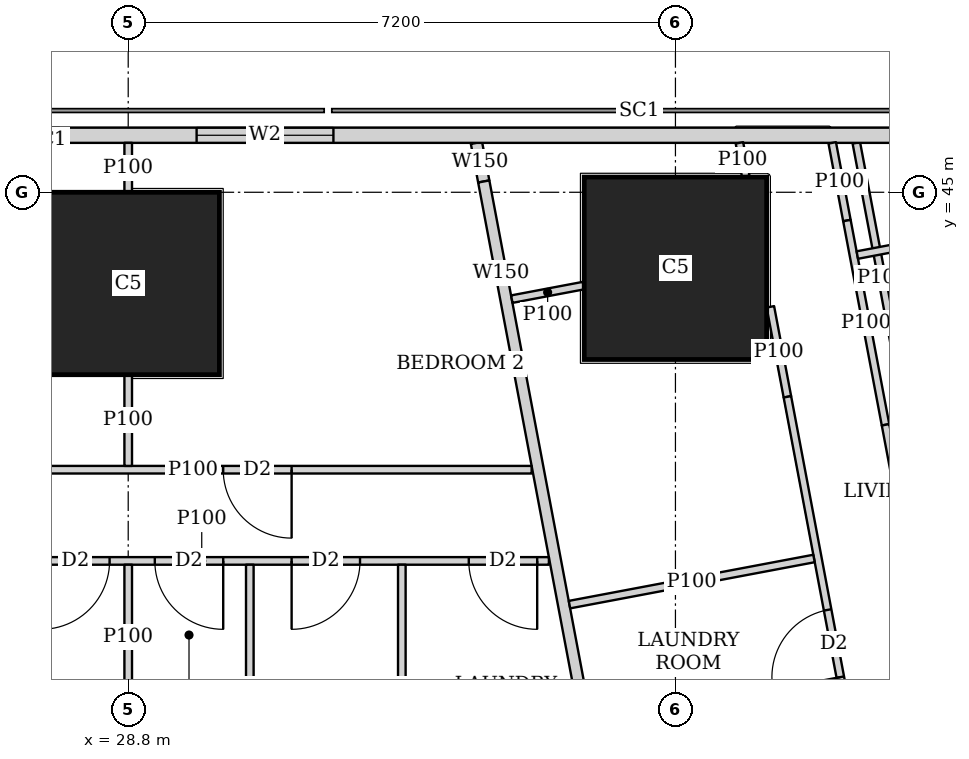
"""IFC4 building model, lengths in metres.
Left out: names, types, materials, properties, quantities, classifications, styles, units other than length and angle.
Written with IfcOpenShell. Run it as: python <this file> out.ifc"""

import sys

from ifc_helpers import new_model, si_unit, direction, frame, frame_2d, origin, origin_2d, place, context, subcontext, project, spatial, rectangle, extrude, element, fill, save


model = new_model("IFC4")
c1 = context("Model", 3, precision=1e-05, world=origin(), true_north=direction((0.0, 1.0)))
c2 = subcontext(c1, "Body", "Model", "MODEL_VIEW")
j1 = project(units=[si_unit("LENGTHUNIT", "METRE"), si_unit("PLANEANGLEUNIT", "RADIAN")], contexts=[c1])
p1 = place(None, origin())
s1 = spatial("IfcSite", under=j1, at=p1, CompositionType="ELEMENT")
p2 = place(p1, origin())
s2 = spatial("IfcBuilding", under=s1, at=p2, CompositionType="ELEMENT")
p3 = place(p2, frame((0.0, 0.0, 242.45)))
s3 = spatial("IfcBuildingStorey", under=s2, at=p3, CompositionType="ELEMENT", Elevation=242.45)
for number, where, z_axis, x_axis in (
    (1, (28.8, 43.8, 0.0), (0.0, 0.0, 1.0), (1.0, 0.0, 0.0)),
    (2, (36.0, 44.0, 0.0), (0.0, 0.0, 1.0), (1.0, 0.0, 0.0)),
):
    element("IfcColumn", number, at=place(p3, frame(where, z_axis=z_axis, x_axis=x_axis)), inside=s3, PredefinedType="COLUMN", context=c2, shape_type="SweptSolid", body=[
        extrude(rectangle(XDim=2.4, YDim=2.4, at=origin_2d()), origin(), (0.0, 0.0, 1.0), 3.75),
    ])
p4 = place(p3, frame((40.106, 45.75, 0.0), z_axis=(0.0, 0.0, 1.0), x_axis=(-1.0, 0.0, 0.0)))
e3 = element("IfcWall", 3, at=p4, inside=s3, PredefinedType="SOLIDWALL", context=c2, shape_type="SweptSolid", body=[
    extrude(rectangle(XDim=25.543, YDim=0.2, at=frame_2d((12.771, 0.0))), origin(), (0.0, 0.0, 1.0), 3.45),
])
p5 = place(p4, frame((8.606, 0.0, 0.9)))
e4 = element("IfcOpeningElement", 4, at=p5, cuts=e3, PredefinedType="OPENING", context=c2, shape_type="SweptSolid", body=[
    extrude(rectangle(XDim=1.8, YDim=1.5, at=frame_2d((0.9, 0.75))), frame((0.0, 0.11, 0.0), z_axis=(0.0, -1.0, 0.0), x_axis=(1.0, 0.0, 0.0)), (0.0, 0.0, 1.0), 0.22),
])
p6 = place(p4, frame((12.206, 0.0, 0.9)))
e5 = element("IfcOpeningElement", 5, at=p6, cuts=e3, PredefinedType="OPENING", context=c2, shape_type="SweptSolid", body=[
    extrude(rectangle(XDim=1.8, YDim=1.5, at=frame_2d((0.9, 0.75))), frame((0.0, 0.11, 0.0), z_axis=(0.0, -1.0, 0.0), x_axis=(1.0, 0.0, 0.0)), (0.0, 0.0, 1.0), 0.22),
])
p7 = place(p4, frame((15.806, 0.0, 0.9)))
e6 = element("IfcOpeningElement", 6, at=p7, cuts=e3, PredefinedType="OPENING", context=c2, shape_type="SweptSolid", body=[
    extrude(rectangle(XDim=1.8, YDim=1.5, at=frame_2d((0.9, 0.75))), frame((0.0, 0.11, 0.0), z_axis=(0.0, -1.0, 0.0), x_axis=(1.0, 0.0, 0.0)), (0.0, 0.0, 1.0), 0.22),
])
p8 = place(p4, frame((20.825, 0.0, 0.9)))
e7 = element("IfcOpeningElement", 7, at=p8, cuts=e3, PredefinedType="OPENING", context=c2, shape_type="SweptSolid", body=[
    extrude(rectangle(XDim=2.4, YDim=1.5, at=frame_2d((1.2, 0.75))), frame((0.0, 0.11, 0.0), z_axis=(0.0, -1.0, 0.0), x_axis=(1.0, 0.0, 0.0)), (0.0, 0.0, 1.0), 0.22),
])
p9 = place(p3, frame((33.382, 45.65, 0.0), z_axis=(0.0, 0.0, 1.0), x_axis=(0.185657456326, -0.982614527122, 0.0)))
e8 = element("IfcWall", 8, at=p9, inside=s3, PredefinedType="SOLIDWALL", context=c2, shape_type="SweptSolid", body=[
    extrude(rectangle(XDim=0.517, YDim=0.15, at=frame_2d((0.258, 0.0))), origin(), (0.0, 0.0, 1.0), 3.45),
])
p10 = place(p3, frame((33.478, 45.142, 0.0), z_axis=(0.0, 0.0, 1.0), x_axis=(0.185393362436, -0.982664388876, 0.0)))
e9 = element("IfcWall", 9, at=p10, inside=s3, PredefinedType="SOLIDWALL", context=c2, shape_type="SweptSolid", body=[
    extrude(rectangle(XDim=2.455, YDim=0.15, at=frame_2d((1.227, 0.0))), origin(), (0.0, 0.0, 1.0), 2.0),
])
p11 = place(p3, frame((33.933, 42.73, 0.0), z_axis=(0.0, 0.0, 1.0), x_axis=(0.185595417643, -0.982626246825, 0.0)))
e10 = element("IfcWall", 10, at=p11, inside=s3, PredefinedType="SOLIDWALL", context=c2, shape_type="SweptSolid", body=[
    extrude(rectangle(XDim=41.051, YDim=0.15, at=frame_2d((20.525, 0.0))), origin(), (0.0, 0.0, 1.0), 2.45),
])
p12 = place(p11, frame((12.266, 0.0, 0.0)))
e11 = element("IfcOpeningElement", 11, at=p12, cuts=e10, PredefinedType="OPENING", context=c2, shape_type="SweptSolid", body=[
    extrude(rectangle(XDim=1.0, YDim=2.1, at=frame_2d((0.5, 1.05))), frame((0.0, 0.085, 0.0), z_axis=(0.0, -1.0, 0.0), x_axis=(1.0, 0.0, 0.0)), (0.0, 0.0, 1.0), 0.17),
])
p13 = place(p11, frame((16.082, 0.0, 0.0)))
e12 = element("IfcOpeningElement", 12, at=p13, cuts=e10, PredefinedType="OPENING", context=c2, shape_type="SweptSolid", body=[
    extrude(rectangle(XDim=1.0, YDim=2.1, at=frame_2d((0.5, 1.05))), frame((0.0, 0.085, 0.0), z_axis=(0.0, -1.0, 0.0), x_axis=(1.0, 0.0, 0.0)), (0.0, 0.0, 1.0), 0.17),
])
p14 = place(p11, frame((30.862, 0.0, 0.0)))
e13 = element("IfcOpeningElement", 13, at=p14, cuts=e10, PredefinedType="OPENING", context=c2, shape_type="SweptSolid", body=[
    extrude(rectangle(XDim=1.0, YDim=2.1, at=frame_2d((0.5, 1.05))), frame((0.0, 0.085, 0.0), z_axis=(0.0, -1.0, 0.0), x_axis=(1.0, 0.0, 0.0)), (0.0, 0.0, 1.0), 0.17),
])
p15 = place(p3, frame((39.054, 42.085, 0.0), z_axis=(0.0, 0.0, 1.0), x_axis=(-0.185791584218, 0.982589175207, 0.0)))
e14 = element("IfcWall", 14, at=p15, inside=s3, PredefinedType="PARTITIONING", context=c2, shape_type="SweptSolid", body=[
    extrude(rectangle(XDim=3.628, YDim=0.1, at=frame_2d((1.814, 0.0))), origin(), (0.0, 0.0, 1.0), 2.0),
])
p16 = place(p3, frame((38.063, 45.65, 0.0), z_axis=(0.0, 0.0, 1.0), x_axis=(0.185677287841, -0.982610779902, 0.0)))
e15 = element("IfcWall", 15, at=p16, inside=s3, PredefinedType="PARTITIONING", context=c2, shape_type="SweptSolid", body=[
    extrude(rectangle(XDim=1.04, YDim=0.1, at=frame_2d((0.52, 0.0))), origin(), (0.0, 0.0, 1.0), 3.45),
])
p17 = place(p3, frame((38.256, 44.628, 0.0), z_axis=(0.0, 0.0, 1.0), x_axis=(0.185700639943, -0.982606366927, 0.0)))
e16 = element("IfcWall", 16, at=p17, inside=s3, PredefinedType="PARTITIONING", context=c2, shape_type="SweptSolid", body=[
    extrude(rectangle(XDim=2.735, YDim=0.1, at=frame_2d((1.367, 0.0))), origin(), (0.0, 0.0, 1.0), 2.0),
])
p18 = place(p3, frame((38.764, 41.941, 0.0), z_axis=(0.0, 0.0, 1.0), x_axis=(0.185548572312, -0.982635093671, 0.0)))
e17 = element("IfcWall", 17, at=p18, inside=s3, PredefinedType="PARTITIONING", context=c2, shape_type="SweptSolid", body=[
    extrude(rectangle(XDim=9.135, YDim=0.1, at=frame_2d((4.568, 0.0))), origin(), (0.0, 0.0, 1.0), 3.45),
])
p19 = place(p18, frame((8.085, 0.0, 0.0)))
e18 = element("IfcOpeningElement", 18, at=p19, cuts=e17, PredefinedType="OPENING", context=c2, shape_type="SweptSolid", body=[
    extrude(rectangle(XDim=0.9, YDim=2.1, at=frame_2d((0.45, 1.05))), frame((0.0, 0.06, 0.0), z_axis=(0.0, -1.0, 0.0), x_axis=(1.0, 0.0, 0.0)), (0.0, 0.0, 1.0), 0.12),
])
p20 = place(p18, frame((3.7, 0.0, 0.0)))
e19 = element("IfcOpeningElement", 19, at=p20, cuts=e17, PredefinedType="OPENING", context=c2, shape_type="SweptSolid", body=[
    extrude(rectangle(XDim=0.9, YDim=2.1, at=frame_2d((0.45, 1.05))), frame((0.0, 0.06, 0.0), z_axis=(0.0, -1.0, 0.0), x_axis=(1.0, 0.0, 0.0)), (0.0, 0.0, 1.0), 0.12),
])
p21 = place(p3, frame((36.842, 45.65, 0.0), z_axis=(0.0, 0.0, 1.0), x_axis=(0.185407859198, -0.982661653748, 0.0)))
e20 = element("IfcWall", 20, at=p21, inside=s3, PredefinedType="PARTITIONING", context=c2, shape_type="SweptSolid", body=[
    extrude(rectangle(XDim=0.448, YDim=0.1, at=frame_2d((0.224, 0.0))), origin(), (0.0, 0.0, 1.0), 3.45),
])
p22 = place(p3, frame((37.249, 43.493, 0.0), z_axis=(0.0, 0.0, 1.0), x_axis=(0.185817643817, -0.982584247404, 0.0)))
e21 = element("IfcWall", 21, at=p22, inside=s3, PredefinedType="PARTITIONING", context=c2, shape_type="SweptSolid", body=[
    extrude(rectangle(XDim=1.205, YDim=0.1, at=frame_2d((0.603, 0.0))), origin(), (0.0, 0.0, 1.0), 2.0),
])
p23 = place(p3, frame((37.473, 42.309, 0.0), z_axis=(0.0, 0.0, 1.0), x_axis=(0.185491912953, -0.982645790827, 0.0)))
e22 = element("IfcWall", 22, at=p23, inside=s3, PredefinedType="PARTITIONING", context=c2, shape_type="SweptSolid", body=[
    extrude(rectangle(XDim=9.737, YDim=0.1, at=frame_2d((4.869, 0.0))), origin(), (0.0, 0.0, 1.0), 3.45),
])
p24 = place(p23, frame((8.232, 0.0, 0.0)))
e23 = element("IfcOpeningElement", 23, at=p24, cuts=e22, PredefinedType="OPENING", context=c2, shape_type="SweptSolid", body=[
    extrude(rectangle(XDim=0.9, YDim=2.1, at=frame_2d((0.45, 1.05))), frame((0.0, 0.06, 0.0), z_axis=(0.0, -1.0, 0.0), x_axis=(1.0, 0.0, 0.0)), (0.0, 0.0, 1.0), 0.12),
])
p25 = place(p23, frame((2.853, 0.0, 0.0)))
e24 = element("IfcOpeningElement", 24, at=p25, cuts=e22, PredefinedType="OPENING", context=c2, shape_type="SweptSolid", body=[
    extrude(rectangle(XDim=0.9, YDim=2.1, at=frame_2d((0.45, 1.05))), frame((0.0, 0.06, 0.0), z_axis=(0.0, -1.0, 0.0), x_axis=(1.0, 0.0, 0.0)), (0.0, 0.0, 1.0), 0.12),
])
p26 = place(p23, frame((5.564, 0.0, 0.0)))
e25 = element("IfcOpeningElement", 25, at=p26, cuts=e22, PredefinedType="OPENING", context=c2, shape_type="SweptSolid", body=[
    extrude(rectangle(XDim=0.9, YDim=2.1, at=frame_2d((0.45, 1.05))), frame((0.0, 0.06, 0.0), z_axis=(0.0, -1.0, 0.0), x_axis=(1.0, 0.0, 0.0)), (0.0, 0.0, 1.0), 0.12),
])
p27 = place(p3, frame((41.968, 44.85, 0.0), z_axis=(0.0, 0.0, 1.0), x_axis=(-0.98258614234, -0.185807623311, 0.0)))
e26 = element("IfcWall", 26, at=p27, inside=s3, PredefinedType="PARTITIONING", context=c2, shape_type="SweptSolid", body=[
    extrude(rectangle(XDim=3.638, YDim=0.1, at=frame_2d((1.819, 0.0))), origin(), (0.0, 0.0, 1.0), 2.0),
])
p28 = place(p3, frame((34.79, 43.772, 0.0), z_axis=(0.0, 0.0, 1.0), x_axis=(-0.982655532093, -0.185440301034, 0.0)))
e27 = element("IfcWall", 27, at=p28, inside=s3, PredefinedType="PARTITIONING", context=c2, shape_type="SweptSolid", body=[
    extrude(rectangle(XDim=0.96, YDim=0.1, at=frame_2d((0.48, 0.0))), origin(), (0.0, 0.0, 1.0), 2.0),
])
p29 = place(p3, frame((37.823, 40.182, 0.0), z_axis=(0.0, 0.0, 1.0), x_axis=(-0.982664729897, -0.18539155487, 0.0)))
e28 = element("IfcWall", 28, at=p29, inside=s3, PredefinedType="PARTITIONING", context=c2, shape_type="SweptSolid", body=[
    extrude(rectangle(XDim=3.274, YDim=0.1, at=frame_2d((1.637, 0.0))), origin(), (0.0, 0.0, 1.0), 3.45),
])
p30 = place(p3, frame((25.2, 41.35, 0.0), z_axis=(0.0, 0.0, 1.0), x_axis=(1.0, 0.0, 0.0)))
e29 = element("IfcWall", 29, at=p30, inside=s3, PredefinedType="PARTITIONING", context=c2, shape_type="SweptSolid", body=[
    extrude(rectangle(XDim=8.908, YDim=0.1, at=frame_2d((4.454, 0.0))), origin(), (0.0, 0.0, 1.0), 3.45),
])
p31 = place(p30, frame((0.2, 0.0, 0.0)))
e30 = element("IfcOpeningElement", 30, at=p31, cuts=e29, PredefinedType="OPENING", context=c2, shape_type="SweptSolid", body=[
    extrude(rectangle(XDim=0.9, YDim=2.1, at=frame_2d((0.45, 1.05))), frame((0.0, 0.06, 0.0), z_axis=(0.0, -1.0, 0.0), x_axis=(1.0, 0.0, 0.0)), (0.0, 0.0, 1.0), 0.12),
])
p32 = place(p30, frame((4.85, 0.0, 0.0)))
e31 = element("IfcOpeningElement", 31, at=p32, cuts=e29, PredefinedType="OPENING", context=c2, shape_type="SweptSolid", body=[
    extrude(rectangle(XDim=0.9, YDim=2.1, at=frame_2d((0.45, 1.05))), frame((0.0, 0.06, 0.0), z_axis=(0.0, -1.0, 0.0), x_axis=(1.0, 0.0, 0.0)), (0.0, 0.0, 1.0), 0.12),
])
p33 = place(p3, frame((25.2, 40.15, 0.0), z_axis=(0.0, 0.0, 1.0), x_axis=(1.0, 0.0, 0.0)))
e32 = element("IfcWall", 32, at=p33, inside=s3, PredefinedType="PARTITIONING", context=c2, shape_type="SweptSolid", body=[
    extrude(rectangle(XDim=9.135, YDim=0.1, at=frame_2d((4.567, 0.0))), origin(), (0.0, 0.0, 1.0), 3.45),
])
p34 = place(p33, frame((0.655, 0.0, 0.0)))
e33 = element("IfcOpeningElement", 33, at=p34, cuts=e32, PredefinedType="OPENING", context=c2, shape_type="SweptSolid", body=[
    extrude(rectangle(XDim=0.9, YDim=2.1, at=frame_2d((0.45, 1.05))), frame((0.0, 0.06, 0.0), z_axis=(0.0, -1.0, 0.0), x_axis=(1.0, 0.0, 0.0)), (0.0, 0.0, 1.0), 0.12),
])
p35 = place(p33, frame((3.95, 0.0, 0.0)))
e34 = element("IfcOpeningElement", 34, at=p35, cuts=e32, PredefinedType="OPENING", context=c2, shape_type="SweptSolid", body=[
    extrude(rectangle(XDim=0.9, YDim=2.1, at=frame_2d((0.45, 1.05))), frame((0.0, 0.06, 0.0), z_axis=(0.0, -1.0, 0.0), x_axis=(1.0, 0.0, 0.0)), (0.0, 0.0, 1.0), 0.12),
])
p36 = place(p33, frame((8.081, 0.0, 0.0)))
e35 = element("IfcOpeningElement", 35, at=p36, cuts=e32, PredefinedType="OPENING", context=c2, shape_type="SweptSolid", body=[
    extrude(rectangle(XDim=0.9, YDim=2.1, at=frame_2d((0.45, 1.05))), frame((0.0, 0.06, 0.0), z_axis=(0.0, -1.0, 0.0), x_axis=(1.0, 0.0, 0.0)), (0.0, 0.0, 1.0), 0.12),
])
p37 = place(p33, frame((2.455, 0.0, 0.0)))
e36 = element("IfcOpeningElement", 36, at=p37, cuts=e32, PredefinedType="OPENING", context=c2, shape_type="SweptSolid", body=[
    extrude(rectangle(XDim=0.9, YDim=2.1, at=frame_2d((0.45, 1.05))), frame((0.0, 0.06, 0.0), z_axis=(0.0, -1.0, 0.0), x_axis=(1.0, 0.0, 0.0)), (0.0, 0.0, 1.0), 0.12),
])
p38 = place(p33, frame((5.75, 0.0, 0.0)))
e37 = element("IfcOpeningElement", 37, at=p38, cuts=e32, PredefinedType="OPENING", context=c2, shape_type="SweptSolid", body=[
    extrude(rectangle(XDim=0.9, YDim=2.1, at=frame_2d((0.45, 1.05))), frame((0.0, 0.06, 0.0), z_axis=(0.0, -1.0, 0.0), x_axis=(1.0, 0.0, 0.0)), (0.0, 0.0, 1.0), 0.12),
])
p39 = place(p3, frame((28.8, 41.4, 0.0), z_axis=(0.0, 0.0, 1.0), x_axis=(0.0, 1.0, 0.0)))
e38 = element("IfcWall", 38, at=p39, inside=s3, PredefinedType="PARTITIONING", context=c2, shape_type="SweptSolid", body=[
    extrude(rectangle(XDim=1.199, YDim=0.1, at=frame_2d((0.6, 0.0))), origin(), (0.0, 0.0, 1.0), 3.45),
])
p40 = place(p3, frame((28.8, 45.001, 0.0), z_axis=(0.0, 0.0, 1.0), x_axis=(0.0, 1.0, 0.0)))
e39 = element("IfcWall", 39, at=p40, inside=s3, PredefinedType="PARTITIONING", context=c2, shape_type="SweptSolid", body=[
    extrude(rectangle(XDim=0.649, YDim=0.1, at=frame_2d((0.324, 0.0))), origin(), (0.0, 0.0, 1.0), 3.45),
])
p41 = place(p3, frame((28.8, 38.201, 0.0), z_axis=(0.0, 0.0, 1.0), x_axis=(0.0, 1.0, 0.0)))
e40 = element("IfcWall", 40, at=p41, inside=s3, PredefinedType="PARTITIONING", context=c2, shape_type="SweptSolid", body=[
    extrude(rectangle(XDim=1.899, YDim=0.1, at=frame_2d((0.95, 0.0))), origin(), (0.0, 0.0, 1.0), 3.45),
])
for number, where, z_axis, x_axis in (
    (41, (32.4, 36.825, 0.0), (0.0, 0.0, 1.0), (0.0, 1.0, 0.0)),
    (42, (30.4, 36.825, 0.0), (0.0, 0.0, 1.0), (0.0, 1.0, 0.0)),
):
    element("IfcWall", number, at=place(p3, frame(where, z_axis=z_axis, x_axis=x_axis)), inside=s3, PredefinedType="PARTITIONING", context=c2, shape_type="SweptSolid", body=[
        extrude(rectangle(XDim=3.275, YDim=0.1, at=frame_2d((1.638, 0.0))), origin(), (0.0, 0.0, 1.0), 3.45),
    ])
p42 = place(p5, origin())
e43 = element("IfcWindow", 43, at=p42, inside=s3, PartitioningType="SINGLE_PANEL", PredefinedType="WINDOW", context=c2, shape_type="SweptSolid", body=[
    extrude(rectangle(XDim=1.8, YDim=1.5, at=frame_2d((0.9, 0.75))), frame((0.0, 0.03, 0.0), z_axis=(0.0, -1.0, 0.0), x_axis=(1.0, 0.0, 0.0)), (0.0, 0.0, 1.0), 0.06),
])
fill(e4, e43)
p43 = place(p6, origin())
e44 = element("IfcWindow", 44, at=p43, inside=s3, PartitioningType="SINGLE_PANEL", PredefinedType="WINDOW", context=c2, shape_type="SweptSolid", body=[
    extrude(rectangle(XDim=1.8, YDim=1.5, at=frame_2d((0.9, 0.75))), frame((0.0, 0.03, 0.0), z_axis=(0.0, -1.0, 0.0), x_axis=(1.0, 0.0, 0.0)), (0.0, 0.0, 1.0), 0.06),
])
fill(e5, e44)
p44 = place(p25, origin())
e45 = element("IfcDoor", 45, at=p44, inside=s3, OperationType="SINGLE_SWING_LEFT", PredefinedType="DOOR", context=c2, shape_type="SweptSolid", body=[
    extrude(rectangle(XDim=0.9, YDim=2.1, at=frame_2d((0.45, 1.05))), frame((0.0, 0.025, 0.0), z_axis=(0.0, -1.0, 0.0), x_axis=(1.0, 0.0, 0.0)), (0.0, 0.0, 1.0), 0.05),
])
fill(e24, e45)
p45 = place(p32, origin())
e46 = element("IfcDoor", 46, at=p45, inside=s3, OperationType="SINGLE_SWING_LEFT", PredefinedType="DOOR", context=c2, shape_type="SweptSolid", body=[
    extrude(rectangle(XDim=0.9, YDim=2.1, at=frame_2d((0.45, 1.05))), frame((0.0, 0.025, 0.0), z_axis=(0.0, -1.0, 0.0), x_axis=(1.0, 0.0, 0.0)), (0.0, 0.0, 1.0), 0.05),
])
fill(e31, e46)
p46 = place(p35, origin())
e47 = element("IfcDoor", 47, at=p46, inside=s3, OperationType="SINGLE_SWING_LEFT", PredefinedType="DOOR", context=c2, shape_type="SweptSolid", body=[
    extrude(rectangle(XDim=0.9, YDim=2.1, at=frame_2d((0.45, 1.05))), frame((0.0, 0.025, 0.0), z_axis=(0.0, -1.0, 0.0), x_axis=(1.0, 0.0, 0.0)), (0.0, 0.0, 1.0), 0.05),
])
fill(e34, e47)
p47 = place(p36, origin())
e48 = element("IfcDoor", 48, at=p47, inside=s3, OperationType="SINGLE_SWING_LEFT", PredefinedType="DOOR", context=c2, shape_type="SweptSolid", body=[
    extrude(rectangle(XDim=0.9, YDim=2.1, at=frame_2d((0.45, 1.05))), frame((0.0, 0.025, 0.0), z_axis=(0.0, -1.0, 0.0), x_axis=(1.0, 0.0, 0.0)), (0.0, 0.0, 1.0), 0.05),
])
fill(e35, e48)
p48 = place(p37, origin())
e49 = element("IfcDoor", 49, at=p48, inside=s3, OperationType="SINGLE_SWING_RIGHT", PredefinedType="DOOR", context=c2, shape_type="SweptSolid", body=[
    extrude(rectangle(XDim=0.9, YDim=2.1, at=frame_2d((0.45, 1.05))), frame((0.0, 0.025, 0.0), z_axis=(0.0, -1.0, 0.0), x_axis=(1.0, 0.0, 0.0)), (0.0, 0.0, 1.0), 0.05),
])
fill(e36, e49)
p49 = place(p38, origin())
e50 = element("IfcDoor", 50, at=p49, inside=s3, OperationType="SINGLE_SWING_RIGHT", PredefinedType="DOOR", context=c2, shape_type="SweptSolid", body=[
    extrude(rectangle(XDim=0.9, YDim=2.1, at=frame_2d((0.45, 1.05))), frame((0.0, 0.025, 0.0), z_axis=(0.0, -1.0, 0.0), x_axis=(1.0, 0.0, 0.0)), (0.0, 0.0, 1.0), 0.05),
])
fill(e37, e50)
save(model, sys.argv[1])
